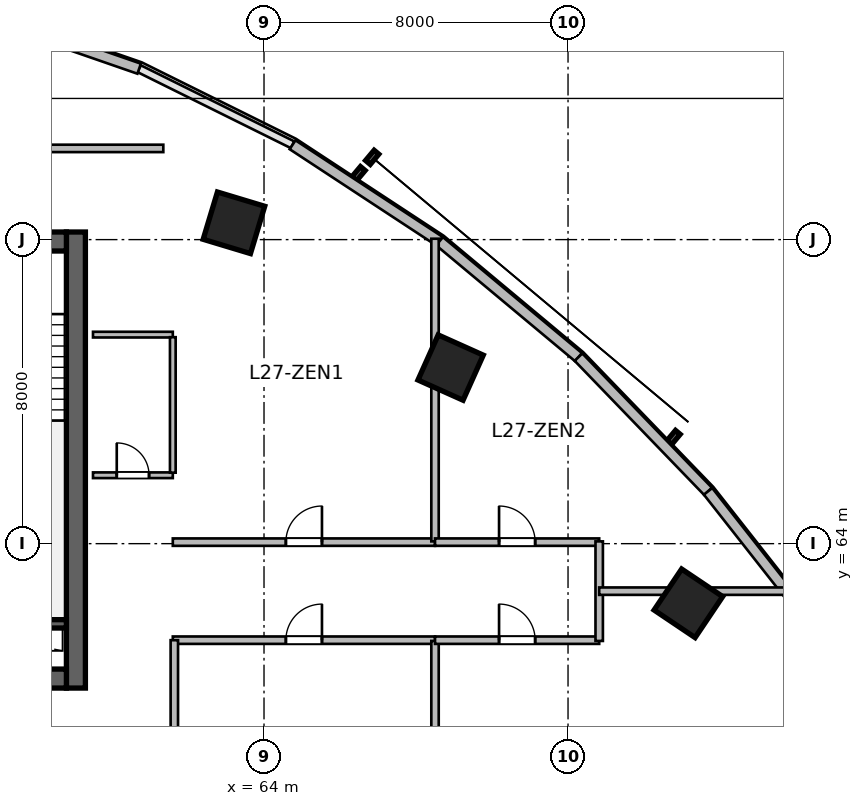
"""IFC4 building model, lengths in metres.
Left out: names, types, materials, properties, quantities, classifications, styles, units other than length and angle.
Written with IfcOpenShell. Run it as: python <this file> out.ifc"""

import sys

from ifc_helpers import new_model, si_unit, direction, frame, frame_2d, origin, origin_2d, place, context, subcontext, project, spatial, rectangle, extrude, source, transform, mapped, element, fill, save


model = new_model("IFC4")
c1 = context("Model", 3, precision=1e-05, world=origin(), true_north=direction((0.0, 1.0)))
c2 = subcontext(c1, "Body", "Model", "MODEL_VIEW")
j1 = project(units=[si_unit("LENGTHUNIT", "METRE"), si_unit("PLANEANGLEUNIT", "RADIAN")], contexts=[c1])
p1 = place(None, origin())
s1 = spatial("IfcSite", under=j1, at=p1, CompositionType="ELEMENT")
p2 = place(p1, origin())
s2 = spatial("IfcBuilding", under=s1, at=p2, CompositionType="ELEMENT")
p3 = place(p2, frame((0.0, 0.0, 115.5)))
s3 = spatial("IfcBuildingStorey", under=s2, at=p3, CompositionType="ELEMENT", Elevation=115.5)
m1 = source(origin(), c2, "Body", "SweptSolid", [
    extrude(rectangle(XDim=12.0, YDim=0.5, at=frame_2d((6.0, 0.0))), origin(), (0.0, 0.0, 1.0), 3.9),
])
p4 = place(p3, frame((59.05, 60.2, 0.0), z_axis=(0.0, 0.0, 1.0), x_axis=(0.0, 1.0, 0.0)))
e1 = element("IfcWall", 1, at=p4, inside=s3, PredefinedType="SHEAR", context=c2, shape_type="MappedRepresentation", body=[
    mapped(m1, transform((0.0, 0.0, 0.0), scale=1.0)),
])
m2 = source(origin(), c2, "Body", "SweptSolid", [
    extrude(rectangle(XDim=21.6, YDim=0.5, at=frame_2d((10.8, 0.0))), origin(), (0.0, 0.0, 1.0), 3.9),
])
p5 = place(p3, frame((37.2, 60.45, 0.0), z_axis=(0.0, 0.0, 1.0), x_axis=(1.0, 0.0, 0.0)))
e2 = element("IfcWall", 2, at=p5, inside=s3, PredefinedType="SHEAR", context=c2, shape_type="MappedRepresentation", body=[
    mapped(m2, transform((0.0, 0.0, 0.0), scale=1.0)),
])
p6 = place(p5, frame((1.1, 0.0, 0.0)))
e3 = element("IfcOpeningElement", 3, at=p6, cuts=e2, PredefinedType="OPENING", context=c2, shape_type="SweptSolid", body=[
    extrude(rectangle(XDim=1.15, YDim=2.15, at=frame_2d((0.575, 1.075))), frame((0.0, 0.26, 0.0), z_axis=(0.0, -1.0, 0.0), x_axis=(1.0, 0.0, 0.0)), (0.0, 0.0, 1.0), 0.52),
])
p7 = place(p5, frame((19.5, 0.0, 0.0)))
e4 = element("IfcOpeningElement", 4, at=p7, cuts=e2, PredefinedType="OPENING", context=c2, shape_type="SweptSolid", body=[
    extrude(rectangle(XDim=0.9, YDim=2.1, at=frame_2d((0.45, 1.05))), frame((0.0, 0.26, 0.0), z_axis=(0.0, -1.0, 0.0), x_axis=(1.0, 0.0, 0.0)), (0.0, 0.0, 1.0), 0.52),
])
p8 = place(p5, frame((12.02, 0.0, 0.0)))
e5 = element("IfcOpeningElement", 5, at=p8, cuts=e2, PredefinedType="OPENING", context=c2, shape_type="SweptSolid", body=[
    extrude(rectangle(XDim=1.6, YDim=2.15, at=frame_2d((0.8, 1.075))), frame((0.0, 0.26, 0.0), z_axis=(0.0, -1.0, 0.0), x_axis=(1.0, 0.0, 0.0)), (0.0, 0.0, 1.0), 0.52),
])
p9 = place(p3, frame((37.2, 71.95, 0.0), z_axis=(0.0, 0.0, 1.0), x_axis=(1.0, 0.0, 0.0)))
e6 = element("IfcWall", 6, at=p9, inside=s3, PredefinedType="SHEAR", context=c2, shape_type="MappedRepresentation", body=[
    mapped(m2, transform((0.0, 0.0, 0.0), scale=1.0)),
])
p10 = place(p9, frame((1.2, 0.0, 0.0)))
e7 = element("IfcOpeningElement", 7, at=p10, cuts=e6, PredefinedType="OPENING", context=c2, shape_type="SweptSolid", body=[
    extrude(rectangle(XDim=0.9, YDim=2.1, at=frame_2d((0.45, 1.05))), frame((0.0, 0.26, 0.0), z_axis=(0.0, -1.0, 0.0), x_axis=(1.0, 0.0, 0.0)), (0.0, 0.0, 1.0), 0.52),
])
p11 = place(p9, frame((14.7, 0.0, 0.0)))
e8 = element("IfcOpeningElement", 8, at=p11, cuts=e6, PredefinedType="OPENING", context=c2, shape_type="SweptSolid", body=[
    extrude(rectangle(XDim=1.2, YDim=2.15, at=frame_2d((0.6, 1.075))), frame((0.0, 0.26, 0.0), z_axis=(0.0, -1.0, 0.0), x_axis=(1.0, 0.0, 0.0)), (0.0, 0.0, 1.0), 0.52),
])
p12 = place(p9, frame((4.15, 0.0, 0.0)))
e9 = element("IfcOpeningElement", 9, at=p12, cuts=e6, PredefinedType="OPENING", context=c2, shape_type="SweptSolid", body=[
    extrude(rectangle(XDim=1.3, YDim=2.15, at=frame_2d((0.65, 1.075))), frame((0.0, 0.26, 0.0), z_axis=(0.0, -1.0, 0.0), x_axis=(1.0, 0.0, 0.0)), (0.0, 0.0, 1.0), 0.52),
])
p13 = place(p9, frame((6.76, 0.0, 0.0)))
e10 = element("IfcOpeningElement", 10, at=p13, cuts=e6, PredefinedType="OPENING", context=c2, shape_type="SweptSolid", body=[
    extrude(rectangle(XDim=0.85, YDim=2.1, at=frame_2d((0.425, 1.05))), frame((0.0, 0.26, 0.0), z_axis=(0.0, -1.0, 0.0), x_axis=(1.0, 0.0, 0.0)), (0.0, 0.0, 1.0), 0.52),
])
p14 = place(p9, frame((8.76, 0.0, 0.0)))
e11 = element("IfcOpeningElement", 11, at=p14, cuts=e6, PredefinedType="OPENING", context=c2, shape_type="SweptSolid", body=[
    extrude(rectangle(XDim=0.85, YDim=2.1, at=frame_2d((0.425, 1.05))), frame((0.0, 0.26, 0.0), z_axis=(0.0, -1.0, 0.0), x_axis=(1.0, 0.0, 0.0)), (0.0, 0.0, 1.0), 0.52),
])
p15 = place(p9, frame((10.725, 0.0, 0.0)))
e12 = element("IfcOpeningElement", 12, at=p15, cuts=e6, PredefinedType="OPENING", context=c2, shape_type="SweptSolid", body=[
    extrude(rectangle(XDim=0.85, YDim=2.1, at=frame_2d((0.425, 1.05))), frame((0.0, 0.26, 0.0), z_axis=(0.0, -1.0, 0.0), x_axis=(1.0, 0.0, 0.0)), (0.0, 0.0, 1.0), 0.52),
])
m3 = source(origin(), c2, "Body", "SweptSolid", [
    extrude(rectangle(XDim=3.27, YDim=0.22, at=frame_2d((1.635, 0.0))), origin(), (0.0, 0.0, 1.0), 3.9),
])
p16 = place(p3, frame((55.53, 61.89, 0.0), z_axis=(0.0, 0.0, 1.0), x_axis=(1.0, 0.0, 0.0)))
e13 = element("IfcWall", 13, at=p16, inside=s3, PredefinedType="SHEAR", context=c2, shape_type="MappedRepresentation", body=[
    mapped(m3, transform((0.0, 0.0, 0.0), scale=1.0)),
])
m4 = source(origin(), c2, "Body", "SweptSolid", [
    extrude(rectangle(XDim=1.3, YDim=1.3, at=origin_2d()), origin(), (0.0, 0.0, 1.0), 3.9),
])
for number, where, z_axis, x_axis in (
    (14, (63.209, 72.442, 0.0), (0.0, 0.0, 1.0), (0.289, 0.957, 0.0)),
    (15, (68.91, 68.633, 0.0), (0.0, 0.0, 1.0), (0.409, 0.912, 0.0)),
    (16, (75.167, 62.43, 0.0), (0.0, 0.0, 1.0), (0.558, 0.83, 0.0)),
):
    element("IfcColumn", number, at=place(p3, frame(where, z_axis=z_axis, x_axis=x_axis)), inside=s3, PredefinedType="COLUMN", context=c2, shape_type="MappedRepresentation", body=[
        mapped(m4, transform((0.0, 0.0, 0.0), scale=1.0)),
    ])
m5 = source(origin(), c2, "Body", "SweptSolid", [
    extrude(rectangle(XDim=4.409, YDim=0.28, at=frame_2d((2.205, 0.0))), origin(), (0.0, 0.0, 1.0), 3.65),
])
p17 = place(p3, frame((56.548, 77.941, 0.0), z_axis=(0.0, 0.0, 1.0), x_axis=(0.944879374121, -0.327418643881, 0.0)))
e17 = element("IfcWall", 17, at=p17, inside=s3, PredefinedType="SOLIDWALL", context=c2, shape_type="MappedRepresentation", body=[
    mapped(m5, transform((0.0, 0.0, 0.0), scale=1.0)),
])
m6 = source(origin(), c2, "Body", "SweptSolid", [
    extrude(rectangle(XDim=4.626, YDim=0.28, at=frame_2d((2.313, 0.0))), origin(), (0.0, 0.0, 1.0), 3.65),
])
p18 = place(p3, frame((64.751, 74.496, 0.0), z_axis=(0.0, 0.0, 1.0), x_axis=(0.83595938331, -0.548791316855, 0.0)))
e18 = element("IfcWall", 18, at=p18, inside=s3, PredefinedType="SOLIDWALL", context=c2, shape_type="MappedRepresentation", body=[
    mapped(m6, transform((0.0, 0.0, 0.0), scale=1.0)),
])
m7 = source(origin(), c2, "Body", "SweptSolid", [
    extrude(rectangle(XDim=4.762, YDim=0.28, at=frame_2d((2.381, 0.0))), origin(), (0.0, 0.0, 1.0), 3.65),
])
p19 = place(p3, frame((68.618, 71.958, 0.0), z_axis=(0.0, 0.0, 1.0), x_axis=(0.767952279762, -0.640507061638, 0.0)))
e19 = element("IfcWall", 19, at=p19, inside=s3, PredefinedType="SOLIDWALL", context=c2, shape_type="MappedRepresentation", body=[
    mapped(m7, transform((0.0, 0.0, 0.0), scale=1.0)),
])
m8 = source(origin(), c2, "Body", "SweptSolid", [
    extrude(rectangle(XDim=4.908, YDim=0.28, at=frame_2d((2.454, 0.0))), origin(), (0.0, 0.0, 1.0), 3.65),
])
p20 = place(p3, frame((72.275, 68.907, 0.0), z_axis=(0.0, 0.0, 1.0), x_axis=(0.694613154328, -0.719383462302, 0.0)))
e20 = element("IfcWall", 20, at=p20, inside=s3, PredefinedType="SOLIDWALL", context=c2, shape_type="MappedRepresentation", body=[
    mapped(m8, transform((0.0, 0.0, 0.0), scale=1.0)),
])
m9 = source(origin(), c2, "Body", "SweptSolid", [
    extrude(rectangle(XDim=5.058, YDim=0.28, at=frame_2d((2.529, 0.0))), origin(), (0.0, 0.0, 1.0), 3.65),
])
p21 = place(p3, frame((75.685, 65.376, 0.0), z_axis=(0.0, 0.0, 1.0), x_axis=(0.618145507434, -0.786063694391, 0.0)))
e21 = element("IfcWall", 21, at=p21, inside=s3, PredefinedType="SOLIDWALL", context=c2, shape_type="MappedRepresentation", body=[
    mapped(m9, transform((0.0, 0.0, 0.0), scale=1.0)),
])
m10 = source(origin(), c2, "Body", "SweptSolid", [
    extrude(rectangle(XDim=2.1, YDim=0.15, at=frame_2d((1.05, 0.0))), origin(), (0.0, 0.0, 1.0), 3.65),
])
p22 = place(p3, frame((59.5, 65.8, 0.0), z_axis=(0.0, 0.0, 1.0), x_axis=(1.0, 0.0, 0.0)))
e22 = element("IfcWall", 22, at=p22, inside=s3, PredefinedType="PARTITIONING", context=c2, shape_type="MappedRepresentation", body=[
    mapped(m10, transform((0.0, 0.0, 0.0), scale=1.0)),
])
p23 = place(p22, frame((0.625, 0.0, 0.0)))
e23 = element("IfcOpeningElement", 23, at=p23, cuts=e22, PredefinedType="OPENING", context=c2, shape_type="SweptSolid", body=[
    extrude(rectangle(XDim=0.85, YDim=2.1, at=frame_2d((0.425, 1.05))), frame((0.0, 0.085, 0.0), z_axis=(0.0, -1.0, 0.0), x_axis=(1.0, 0.0, 0.0)), (0.0, 0.0, 1.0), 0.17),
])
p24 = place(p3, frame((59.5, 69.5, 0.0), z_axis=(0.0, 0.0, 1.0), x_axis=(1.0, 0.0, 0.0)))
e24 = element("IfcWall", 24, at=p24, inside=s3, PredefinedType="PARTITIONING", context=c2, shape_type="MappedRepresentation", body=[
    mapped(m10, transform((0.0, 0.0, 0.0), scale=1.0)),
])
m11 = source(origin(), c2, "Body", "SweptSolid", [
    extrude(rectangle(XDim=3.565, YDim=0.15, at=frame_2d((1.783, 0.0))), origin(), (0.0, 0.0, 1.0), 3.65),
])
p25 = place(p3, frame((61.6, 65.867, 0.0), z_axis=(0.0, 0.0, 1.0), x_axis=(0.0, 1.0, 0.0)))
e25 = element("IfcWall", 25, at=p25, inside=s3, PredefinedType="PARTITIONING", context=c2, shape_type="MappedRepresentation", body=[
    mapped(m11, transform((0.0, 0.0, 0.0), scale=1.0)),
])
m12 = source(origin(), c2, "Body", "SweptSolid", [
    extrude(rectangle(XDim=13.2, YDim=0.195, at=frame_2d((6.6, 0.0))), origin(), (0.0, 0.0, 1.0), 3.022),
])
p26 = place(p3, frame((48.15, 74.4, 0.0), z_axis=(0.0, 0.0, 1.0), x_axis=(1.0, 0.0, 0.0)))
e26 = element("IfcWall", 26, at=p26, inside=s3, PredefinedType="PARTITIONING", context=c2, shape_type="MappedRepresentation", body=[
    mapped(m12, transform((0.0, 0.0, 0.0), scale=1.0)),
])
p27 = place(p26, frame((5.6, 0.0, 0.0)))
e27 = element("IfcOpeningElement", 27, at=p27, cuts=e26, PredefinedType="OPENING", context=c2, shape_type="SweptSolid", body=[
    extrude(rectangle(XDim=1.1, YDim=2.15, at=frame_2d((0.55, 1.075))), frame((0.0, 0.107, 0.0), z_axis=(0.0, -1.0, 0.0), x_axis=(1.0, 0.0, 0.0)), (0.0, 0.0, 1.0), 0.215),
])
m13 = source(origin(), c2, "Body", "SweptSolid", [
    extrude(rectangle(XDim=6.9, YDim=0.195, at=frame_2d((3.45, 0.0))), origin(), (0.0, 0.0, 1.0), 3.65),
])
p28 = place(p3, frame((61.6, 64.04, 0.0), z_axis=(0.0, 0.0, 1.0), x_axis=(1.0, 0.0, 0.0)))
e28 = element("IfcWall", 28, at=p28, inside=s3, PredefinedType="PARTITIONING", context=c2, shape_type="MappedRepresentation", body=[
    mapped(m13, transform((0.0, 0.0, 0.0), scale=1.0)),
])
p29 = place(p28, frame((2.975, 0.0, 0.0)))
e29 = element("IfcOpeningElement", 29, at=p29, cuts=e28, PredefinedType="OPENING", context=c2, shape_type="SweptSolid", body=[
    extrude(rectangle(XDim=0.95, YDim=2.1, at=frame_2d((0.475, 1.05))), frame((0.0, 0.107, 0.0), z_axis=(0.0, -1.0, 0.0), x_axis=(1.0, 0.0, 0.0)), (0.0, 0.0, 1.0), 0.215),
])
m14 = source(origin(), c2, "Body", "SweptSolid", [
    extrude(rectangle(XDim=7.963, YDim=0.195, at=frame_2d((3.982, 0.0))), origin(), (0.0, 0.0, 1.0), 2.942),
])
p30 = place(p3, frame((68.5, 64.06, 0.0), z_axis=(0.0, 0.0, 1.0), x_axis=(0.0, 1.0, 0.0)))
e30 = element("IfcWall", 30, at=p30, inside=s3, PredefinedType="PARTITIONING", context=c2, shape_type="MappedRepresentation", body=[
    mapped(m14, transform((0.0, 0.0, 0.0), scale=1.0)),
])
m15 = source(origin(), c2, "Body", "SweptSolid", [
    extrude(rectangle(XDim=4.32, YDim=0.195, at=frame_2d((2.16, 0.0))), origin(), (0.0, 0.0, 1.0), 3.65),
])
p31 = place(p3, frame((68.5, 64.04, 0.0), z_axis=(0.0, 0.0, 1.0), x_axis=(1.0, 0.0, 0.0)))
e31 = element("IfcWall", 31, at=p31, inside=s3, PredefinedType="PARTITIONING", context=c2, shape_type="MappedRepresentation", body=[
    mapped(m15, transform((0.0, 0.0, 0.0), scale=1.0)),
])
p32 = place(p31, frame((1.685, 0.0, 0.0)))
e32 = element("IfcOpeningElement", 32, at=p32, cuts=e31, PredefinedType="OPENING", context=c2, shape_type="SweptSolid", body=[
    extrude(rectangle(XDim=0.95, YDim=2.1, at=frame_2d((0.475, 1.05))), frame((0.0, 0.107, 0.0), z_axis=(0.0, -1.0, 0.0), x_axis=(1.0, 0.0, 0.0)), (0.0, 0.0, 1.0), 0.215),
])
p33 = place(p3, frame((61.6, 61.46, 0.0), z_axis=(0.0, 0.0, 1.0), x_axis=(1.0, 0.0, 0.0)))
e33 = element("IfcWall", 33, at=p33, inside=s3, PredefinedType="PARTITIONING", context=c2, shape_type="MappedRepresentation", body=[
    mapped(m13, transform((0.0, 0.0, 0.0), scale=1.0)),
])
p34 = place(p33, frame((2.975, 0.0, 0.0)))
e34 = element("IfcOpeningElement", 34, at=p34, cuts=e33, PredefinedType="OPENING", context=c2, shape_type="SweptSolid", body=[
    extrude(rectangle(XDim=0.95, YDim=2.1, at=frame_2d((0.475, 1.05))), frame((0.0, 0.107, 0.0), z_axis=(0.0, -1.0, 0.0), x_axis=(1.0, 0.0, 0.0)), (0.0, 0.0, 1.0), 0.215),
])
m16 = source(origin(), c2, "Body", "SweptSolid", [
    extrude(rectangle(XDim=23.346, YDim=0.195, at=frame_2d((11.673, 0.0))), origin(), (0.0, 0.0, 1.0), 2.942),
])
p35 = place(p3, frame((68.5, 38.094, 0.0), z_axis=(0.0, 0.0, 1.0), x_axis=(0.0, 1.0, 0.0)))
e35 = element("IfcWall", 35, at=p35, inside=s3, PredefinedType="PARTITIONING", context=c2, shape_type="MappedRepresentation", body=[
    mapped(m16, transform((0.0, 0.0, 0.0), scale=1.0)),
])
p36 = place(p3, frame((68.5, 61.46, 0.0), z_axis=(0.0, 0.0, 1.0), x_axis=(1.0, 0.0, 0.0)))
e36 = element("IfcWall", 36, at=p36, inside=s3, PredefinedType="PARTITIONING", context=c2, shape_type="MappedRepresentation", body=[
    mapped(m15, transform((0.0, 0.0, 0.0), scale=1.0)),
])
p37 = place(p36, frame((1.685, 0.0, 0.0)))
e37 = element("IfcOpeningElement", 37, at=p37, cuts=e36, PredefinedType="OPENING", context=c2, shape_type="SweptSolid", body=[
    extrude(rectangle(XDim=0.95, YDim=2.1, at=frame_2d((0.475, 1.05))), frame((0.0, 0.107, 0.0), z_axis=(0.0, -1.0, 0.0), x_axis=(1.0, 0.0, 0.0)), (0.0, 0.0, 1.0), 0.215),
])
m17 = source(origin(), c2, "Body", "SweptSolid", [
    extrude(rectangle(XDim=13.988, YDim=0.195, at=frame_2d((6.994, 0.0))), origin(), (0.0, 0.0, 1.0), 2.942),
])
p38 = place(p3, frame((61.64, 47.472, 0.0), z_axis=(0.0, 0.0, 1.0), x_axis=(0.0, 1.0, 0.0)))
e38 = element("IfcWall", 38, at=p38, inside=s3, PredefinedType="PARTITIONING", context=c2, shape_type="MappedRepresentation", body=[
    mapped(m17, transform((0.0, 0.0, 0.0), scale=1.0)),
])
m18 = source(origin(), c2, "Body", "SweptSolid", [
    extrude(rectangle(XDim=2.62, YDim=0.195, at=frame_2d((1.31, 0.0))), origin(), (0.0, 0.0, 1.0), 3.324),
])
p39 = place(p3, frame((72.82, 61.44, 0.0), z_axis=(0.0, 0.0, 1.0), x_axis=(0.0, 1.0, 0.0)))
e39 = element("IfcWall", 39, at=p39, inside=s3, PredefinedType="PARTITIONING", context=c2, shape_type="MappedRepresentation", body=[
    mapped(m18, transform((0.0, 0.0, 0.0), scale=1.0)),
])
m19 = source(origin(), c2, "Body", "SweptSolid", [
    extrude(rectangle(XDim=4.917, YDim=0.195, at=frame_2d((2.459, 0.0))), origin(), (0.0, 0.0, 1.0), 3.65),
])
p40 = place(p3, frame((72.82, 62.75, 0.0), z_axis=(0.0, 0.0, 1.0), x_axis=(1.0, 0.0, 0.0)))
e40 = element("IfcWall", 40, at=p40, inside=s3, PredefinedType="PARTITIONING", context=c2, shape_type="MappedRepresentation", body=[
    mapped(m19, transform((0.0, 0.0, 0.0), scale=1.0)),
])
m20 = source(origin(), c2, "Body", "SweptSolid", [
    extrude(rectangle(XDim=0.85, YDim=2.1, at=frame_2d((0.425, 1.05))), frame((0.0, 0.025, 0.0), z_axis=(0.0, -1.0, 0.0), x_axis=(1.0, 0.0, 0.0)), (0.0, 0.0, 1.0), 0.05),
])
p41 = place(p23, origin())
e41 = element("IfcDoor", 41, at=p41, inside=s3, OperationType="SINGLE_SWING_LEFT", PredefinedType="DOOR", context=c2, shape_type="MappedRepresentation", body=[
    mapped(m20, transform((0.0, 0.0, 0.0), scale=1.0)),
])
fill(e23, e41)
m21 = source(origin(), c2, "Body", "SweptSolid", [
    extrude(rectangle(XDim=0.95, YDim=2.1, at=frame_2d((0.475, 1.05))), frame((0.0, 0.025, 0.0), z_axis=(0.0, -1.0, 0.0), x_axis=(1.0, 0.0, 0.0)), (0.0, 0.0, 1.0), 0.05),
])
p42 = place(p29, origin())
e42 = element("IfcDoor", 42, at=p42, inside=s3, OperationType="SINGLE_SWING_RIGHT", PredefinedType="DOOR", context=c2, shape_type="MappedRepresentation", body=[
    mapped(m21, transform((0.0, 0.0, 0.0), scale=1.0)),
])
fill(e29, e42)
p43 = place(p32, origin())
e43 = element("IfcDoor", 43, at=p43, inside=s3, OperationType="SINGLE_SWING_LEFT", PredefinedType="DOOR", context=c2, shape_type="MappedRepresentation", body=[
    mapped(m21, transform((0.0, 0.0, 0.0), scale=1.0)),
])
fill(e32, e43)
p44 = place(p34, origin())
e44 = element("IfcDoor", 44, at=p44, inside=s3, OperationType="SINGLE_SWING_RIGHT", PredefinedType="DOOR", context=c2, shape_type="MappedRepresentation", body=[
    mapped(m21, transform((0.0, 0.0, 0.0), scale=1.0)),
])
fill(e34, e44)
p45 = place(p37, origin())
e45 = element("IfcDoor", 45, at=p45, inside=s3, OperationType="SINGLE_SWING_LEFT", PredefinedType="DOOR", context=c2, shape_type="MappedRepresentation", body=[
    mapped(m21, transform((0.0, 0.0, 0.0), scale=1.0)),
])
fill(e37, e45)
save(model, sys.argv[1])
